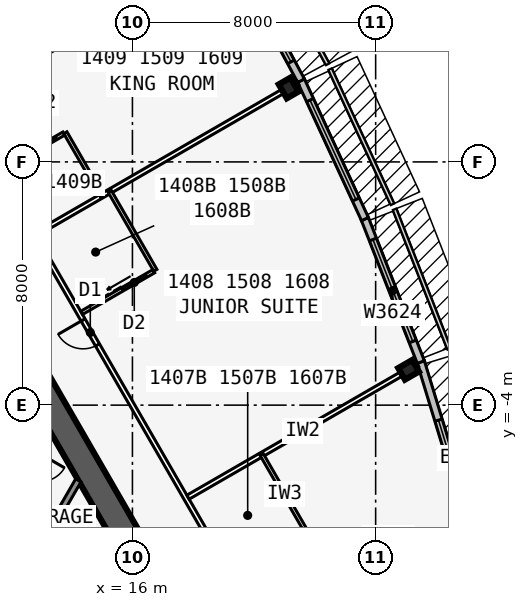
"""IFC4 building model, lengths in metres.
Left out: names, types, materials, properties, quantities, classifications, styles, units other than length and angle.
Written with IfcOpenShell. Run it as: python <this file> out.ifc"""

import sys

from ifc_helpers import new_model, si_unit, direction, frame, frame_2d, origin, origin_2d, place, context, subcontext, project, spatial, rectangle, i_section, extrude, element, fill, save


model = new_model("IFC4")
c1 = context("Model", 3, precision=1e-05, world=origin(), true_north=direction((0.0, 1.0)))
c2 = subcontext(c1, "Body", "Model", "MODEL_VIEW")
j1 = project(units=[si_unit("LENGTHUNIT", "METRE"), si_unit("PLANEANGLEUNIT", "RADIAN")], contexts=[c1])
p1 = place(None, origin())
s1 = spatial("IfcSite", under=j1, at=p1, CompositionType="ELEMENT")
p2 = place(p1, origin())
s2 = spatial("IfcBuilding", under=s1, at=p2, CompositionType="ELEMENT")
p3 = place(p2, frame((0.0, 0.0, 59.1)))
s3 = spatial("IfcBuildingStorey", under=s2, at=p3, CompositionType="ELEMENT", Elevation=59.1)
p4 = place(p3, frame((16.5, -9.526, 0.0), z_axis=(0.0, 0.0, 1.0), x_axis=(-0.499999749417, 0.866025548458, 0.0)))
e1 = element("IfcWall", 1, at=p4, inside=s3, PredefinedType="SHEAR", context=c2, shape_type="SweptSolid", body=[
    extrude(rectangle(XDim=33.0, YDim=0.9, at=frame_2d((16.5, 0.0))), origin(), (0.0, 0.0, 1.0), 3.4),
])
p5 = place(p4, frame((14.15, 0.0, 0.0)))
e2 = element("IfcOpeningElement", 2, at=p5, cuts=e1, PredefinedType="OPENING", context=c2, shape_type="SweptSolid", body=[
    extrude(rectangle(XDim=1.8, YDim=2.13, at=frame_2d((0.9, 1.065))), frame((0.0, 0.46, 0.0), z_axis=(0.0, -1.0, 0.0), x_axis=(1.0, 0.0, 0.0)), (0.0, 0.0, 1.0), 0.92),
])
p6 = place(p4, frame((12.6, 0.0, 0.0)))
e3 = element("IfcOpeningElement", 3, at=p6, cuts=e1, PredefinedType="OPENING", context=c2, shape_type="SweptSolid", body=[
    extrude(rectangle(XDim=1.0, YDim=2.13, at=frame_2d((0.5, 1.065))), frame((0.0, 0.46, 0.0), z_axis=(0.0, -1.0, 0.0), x_axis=(1.0, 0.0, 0.0)), (0.0, 0.0, 1.0), 0.92),
])
for number, where, z_axis, x_axis in (
    (4, (25.083, -2.839, 0.0), (0.0, 0.0, 1.0), (-0.5, 0.866, 0.0)),
    (5, (21.137, 6.43, 0.0), (0.0, 0.0, 1.0), (0.866, 0.5, 0.0)),
):
    element("IfcColumn", number, at=place(p3, frame(where, z_axis=z_axis, x_axis=x_axis)), inside=s3, PredefinedType="COLUMN", context=c2, shape_type="SweptSolid", body=[
        extrude(i_section(OverallWidth=0.442, OverallDepth=0.531, WebThickness=0.066, FlangeThickness=0.106, at=origin_2d()), origin(), (0.0, 0.0, 1.0), 3.4),
    ])
p7 = place(p3, frame((15.312, 8.84, 0.0), z_axis=(0.0, 0.0, 1.0), x_axis=(0.866025403784, 0.5, 0.0)))
e6 = element("IfcColumn", 6, at=p7, inside=s3, PredefinedType="COLUMN", context=c2, shape_type="SweptSolid", body=[
    extrude(rectangle(XDim=2.4, YDim=2.4, at=origin_2d()), origin(), (0.0, 0.0, 1.0), 3.4),
])
p8 = place(p3, frame((27.88, -10.429, 0.0), z_axis=(0.0, 0.0, 1.0), x_axis=(-0.2919790669, 0.956424709265, 0.0)))
e7 = element("IfcWall", 7, at=p8, inside=s3, PredefinedType="STANDARD", context=c2, shape_type="SweptSolid", body=[
    extrude(rectangle(XDim=8.211, YDim=0.25, at=frame_2d((4.105, 0.0))), origin(), (0.0, 0.0, 1.0), 3.235),
])
p9 = place(p8, frame((2.006, 0.0, 0.45)))
e8 = element("IfcOpeningElement", 8, at=p9, cuts=e7, PredefinedType="OPENING", context=c2, shape_type="SweptSolid", body=[
    extrude(rectangle(XDim=4.2, YDim=2.4, at=frame_2d((2.1, 1.2))), frame((0.0, 0.135, 0.0), z_axis=(0.0, -1.0, 0.0), x_axis=(1.0, 0.0, 0.0)), (0.0, 0.0, 1.0), 0.27),
])
p10 = place(p3, frame((25.486, -2.584, 0.0), z_axis=(0.0, 0.0, 1.0), x_axis=(-0.364013463868, 0.931393685894, 0.0)))
e9 = element("IfcWall", 9, at=p10, inside=s3, PredefinedType="STANDARD", context=c2, shape_type="SweptSolid", body=[
    extrude(rectangle(XDim=5.058, YDim=0.25, at=frame_2d((2.529, 0.0))), origin(), (0.0, 0.0, 1.0), 3.235),
])
p11 = place(p10, frame((0.729, 0.0, 0.45)))
e10 = element("IfcOpeningElement", 10, at=p11, cuts=e9, PredefinedType="OPENING", context=c2, shape_type="SweptSolid", body=[
    extrude(rectangle(XDim=3.6, YDim=2.4, at=frame_2d((1.8, 1.2))), frame((0.0, 0.135, 0.0), z_axis=(0.0, -1.0, 0.0), x_axis=(1.0, 0.0, 0.0)), (0.0, 0.0, 1.0), 0.27),
])
p12 = place(p3, frame((23.648, 2.119, 0.0), z_axis=(0.0, 0.0, 1.0), x_axis=(-0.419203100754, 0.907892482796, 0.0)))
e11 = element("IfcWall", 11, at=p12, inside=s3, PredefinedType="STANDARD", context=c2, shape_type="SweptSolid", body=[
    extrude(rectangle(XDim=5.021, YDim=0.25, at=frame_2d((2.51, 0.0))), origin(), (0.0, 0.0, 1.0), 3.235),
])
p13 = place(p12, frame((0.71, 0.0, 0.45)))
e12 = element("IfcOpeningElement", 12, at=p13, cuts=e11, PredefinedType="OPENING", context=c2, shape_type="SweptSolid", body=[
    extrude(rectangle(XDim=3.6, YDim=2.4, at=frame_2d((1.8, 1.2))), frame((0.0, 0.135, 0.0), z_axis=(0.0, -1.0, 0.0), x_axis=(1.0, 0.0, 0.0)), (0.0, 0.0, 1.0), 0.27),
])
p14 = place(p3, frame((21.547, 6.671, 0.0), z_axis=(0.0, 0.0, 1.0), x_axis=(-0.473412820489, 0.880840678782, 0.0)))
e13 = element("IfcWall", 13, at=p14, inside=s3, PredefinedType="STANDARD", context=c2, shape_type="SweptSolid", body=[
    extrude(rectangle(XDim=5.002, YDim=0.25, at=frame_2d((2.501, 0.0))), origin(), (0.0, 0.0, 1.0), 3.235),
])
p15 = place(p14, frame((0.701, 0.0, 0.45)))
e14 = element("IfcOpeningElement", 14, at=p15, cuts=e13, PredefinedType="OPENING", context=c2, shape_type="SweptSolid", body=[
    extrude(rectangle(XDim=3.6, YDim=2.4, at=frame_2d((1.8, 1.2))), frame((0.0, 0.135, 0.0), z_axis=(0.0, -1.0, 0.0), x_axis=(1.0, 0.0, 0.0)), (0.0, 0.0, 1.0), 0.27),
])
p16 = place(p3, frame((20.027, -10.985, 0.0), z_axis=(0.0, 0.0, 1.0), x_axis=(-0.500001677587, 0.866024435227, 0.0)))
e15 = element("IfcWall", 15, at=p16, inside=s3, PredefinedType="PARTITIONING", context=c2, shape_type="SweptSolid", body=[
    extrude(rectangle(XDim=39.054, YDim=0.15, at=frame_2d((19.527, 0.0))), origin(), (0.0, 0.0, 1.0), 3.235),
])
p17 = place(p16, frame((0.352, 0.0, 0.0)))
e16 = element("IfcOpeningElement", 16, at=p17, cuts=e15, PredefinedType="OPENING", context=c2, shape_type="SweptSolid", body=[
    extrude(rectangle(XDim=0.95, YDim=2.13, at=frame_2d((0.475, 1.065))), frame((0.0, 0.085, 0.0), z_axis=(0.0, -1.0, 0.0), x_axis=(1.0, 0.0, 0.0)), (0.0, 0.0, 1.0), 0.17),
])
p18 = place(p16, frame((10.352, 0.0, 0.0)))
e17 = element("IfcOpeningElement", 17, at=p18, cuts=e15, PredefinedType="OPENING", context=c2, shape_type="SweptSolid", body=[
    extrude(rectangle(XDim=0.95, YDim=2.13, at=frame_2d((0.475, 1.065))), frame((0.0, 0.085, 0.0), z_axis=(0.0, -1.0, 0.0), x_axis=(1.0, 0.0, 0.0)), (0.0, 0.0, 1.0), 0.17),
])
p19 = place(p16, frame((17.152, 0.0, 0.0)))
e18 = element("IfcOpeningElement", 18, at=p19, cuts=e15, PredefinedType="OPENING", context=c2, shape_type="SweptSolid", body=[
    extrude(rectangle(XDim=0.95, YDim=2.13, at=frame_2d((0.475, 1.065))), frame((0.0, 0.085, 0.0), z_axis=(0.0, -1.0, 0.0), x_axis=(1.0, 0.0, 0.0)), (0.0, 0.0, 1.0), 0.17),
])
p20 = place(p16, frame((20.952, 0.0, 0.0)))
e19 = element("IfcOpeningElement", 19, at=p20, cuts=e15, PredefinedType="OPENING", context=c2, shape_type="SweptSolid", body=[
    extrude(rectangle(XDim=0.95, YDim=2.13, at=frame_2d((0.475, 1.065))), frame((0.0, 0.085, 0.0), z_axis=(0.0, -1.0, 0.0), x_axis=(1.0, 0.0, 0.0)), (0.0, 0.0, 1.0), 0.17),
])
p21 = place(p16, frame((27.752, 0.0, 0.0)))
e20 = element("IfcOpeningElement", 20, at=p21, cuts=e15, PredefinedType="OPENING", context=c2, shape_type="SweptSolid", body=[
    extrude(rectangle(XDim=0.95, YDim=2.13, at=frame_2d((0.475, 1.065))), frame((0.0, 0.085, 0.0), z_axis=(0.0, -1.0, 0.0), x_axis=(1.0, 0.0, 0.0)), (0.0, 0.0, 1.0), 0.17),
])
p22 = place(p16, frame((37.752, 0.0, 0.0)))
e21 = element("IfcOpeningElement", 21, at=p22, cuts=e15, PredefinedType="OPENING", context=c2, shape_type="SweptSolid", body=[
    extrude(rectangle(XDim=0.95, YDim=2.13, at=frame_2d((0.475, 1.065))), frame((0.0, 0.085, 0.0), z_axis=(0.0, -1.0, 0.0), x_axis=(1.0, 0.0, 0.0)), (0.0, 0.0, 1.0), 0.17),
])
p23 = place(p3, frame((17.829, -7.027, 0.0), z_axis=(0.0, 0.0, 1.0), x_axis=(0.866032659912, 0.499987431809, 0.0)))
e22 = element("IfcWall", 22, at=p23, inside=s3, PredefinedType="PARTITIONING", context=c2, shape_type="SweptSolid", body=[
    extrude(rectangle(XDim=8.72, YDim=0.15, at=frame_2d((4.36, 0.0))), origin(), (0.0, 0.0, 1.0), 2.389),
])
p24 = place(p3, frame((12.829, 1.633, 0.0), z_axis=(0.0, 0.0, 1.0), x_axis=(0.866026934769, 0.499997348248, 0.0)))
e23 = element("IfcWall", 23, at=p24, inside=s3, PredefinedType="PARTITIONING", context=c2, shape_type="SweptSolid", body=[
    extrude(rectangle(XDim=9.943, YDim=0.15, at=frame_2d((4.971, 0.0))), origin(), (0.0, 0.0, 1.0), 2.389),
])
p25 = place(p3, frame((10.329, 5.963, 0.0), z_axis=(0.0, 0.0, 1.0), x_axis=(0.866021688545, 0.500006434927, 0.0)))
e24 = element("IfcWall", 24, at=p25, inside=s3, PredefinedType="PARTITIONING", context=c2, shape_type="SweptSolid", body=[
    extrude(rectangle(XDim=10.096, YDim=0.15, at=frame_2d((5.048, 0.0))), origin(), (0.0, 0.0, 1.0), 2.389),
])
for number, where, z_axis, x_axis in (
    (25, (21.753, -8.225, 0.0), (0.0, 0.0, 1.0), (-0.5, 0.866, 0.0)),
    (26, (16.753, 0.435, 0.0), (0.0, 0.0, 1.0), (-0.5, 0.866, 0.0)),
):
    element("IfcWall", number, at=place(p3, frame(where, z_axis=z_axis, x_axis=x_axis)), inside=s3, PredefinedType="PLUMBINGWALL", context=c2, shape_type="SweptSolid", body=[
        extrude(rectangle(XDim=3.0, YDim=0.12, at=frame_2d((1.5, 0.0))), origin(), (0.0, 0.0, 1.0), 3.235),
    ])
p26 = place(p3, frame((14.329, -0.965, 0.0), z_axis=(0.0, 0.0, 1.0), x_axis=(0.866035715982, 0.499982138324, 0.0)))
e27 = element("IfcWall", 27, at=p26, inside=s3, PredefinedType="PLUMBINGWALL", context=c2, shape_type="SweptSolid", body=[
    extrude(rectangle(XDim=2.74, YDim=0.12, at=frame_2d((1.37, 0.0))), origin(), (0.0, 0.0, 1.0), 3.235),
])
p27 = place(p26, frame((1.55, 0.0, 0.0)))
e28 = element("IfcOpeningElement", 28, at=p27, cuts=e27, PredefinedType="OPENING", context=c2, shape_type="SweptSolid", body=[
    extrude(rectangle(XDim=0.9, YDim=2.13, at=frame_2d((0.45, 1.065))), frame((0.0, 0.07, 0.0), z_axis=(0.0, -1.0, 0.0), x_axis=(1.0, 0.0, 0.0)), (0.0, 0.0, 1.0), 0.14),
])
p28 = place(p3, frame((14.993, 2.883, 0.0), z_axis=(0.0, 0.0, 1.0), x_axis=(-0.500001309137, 0.866024647952, 0.0)))
e29 = element("IfcWall", 29, at=p28, inside=s3, PredefinedType="PLUMBINGWALL", context=c2, shape_type="SweptSolid", body=[
    extrude(rectangle(XDim=2.4, YDim=0.12, at=frame_2d((1.2, 0.0))), origin(), (0.0, 0.0, 1.0), 3.235),
])
p29 = place(p3, frame((11.628, 3.711, 0.0), z_axis=(0.0, 0.0, 1.0), x_axis=(0.866048967903, 0.499959183527, 0.0)))
e30 = element("IfcWall", 30, at=p29, inside=s3, PredefinedType="PLUMBINGWALL", context=c2, shape_type="SweptSolid", body=[
    extrude(rectangle(XDim=2.44, YDim=0.12, at=frame_2d((1.22, 0.0))), origin(), (0.0, 0.0, 1.0), 3.235),
])
p30 = place(p29, frame((1.25, 0.0, 0.0)))
e31 = element("IfcOpeningElement", 31, at=p30, cuts=e30, PredefinedType="OPENING", context=c2, shape_type="SweptSolid", body=[
    extrude(rectangle(XDim=0.9, YDim=2.13, at=frame_2d((0.45, 1.065))), frame((0.0, 0.07, 0.0), z_axis=(0.0, -1.0, 0.0), x_axis=(1.0, 0.0, 0.0)), (0.0, 0.0, 1.0), 0.14),
])
p31 = place(p3, frame((14.219, -6.476, 0.0), z_axis=(0.0, 0.0, 1.0), x_axis=(-0.499952404951, -0.866052881055, 0.0)))
e32 = element("IfcWall", 32, at=p31, inside=s3, PredefinedType="SOLIDWALL", context=c2, shape_type="SweptSolid", body=[
    extrude(rectangle(XDim=3.002, YDim=0.2, at=frame_2d((1.501, 0.0))), origin(), (0.0, 0.0, 1.0), 3.235),
])
p32 = place(p3, frame((13.354, -4.976, 0.0), z_axis=(0.0, 0.0, 1.0), x_axis=(-0.499999210213, -0.866025859768, 0.0)))
e33 = element("IfcWall", 33, at=p32, inside=s3, PredefinedType="PARTITIONING", context=c2, shape_type="SweptSolid", body=[
    extrude(rectangle(XDim=4.734, YDim=0.1, at=frame_2d((2.367, 0.0))), origin(), (0.0, 0.0, 1.0), 3.235),
])
p33 = place(p32, frame((0.734, 0.0, 0.0)))
e34 = element("IfcOpeningElement", 34, at=p33, cuts=e33, PredefinedType="OPENING", context=c2, shape_type="SweptSolid", body=[
    extrude(rectangle(XDim=0.9, YDim=2.13, at=frame_2d((0.45, 1.065))), frame((0.0, 0.06, 0.0), z_axis=(0.0, -1.0, 0.0), x_axis=(1.0, 0.0, 0.0)), (0.0, 0.0, 1.0), 0.12),
])
p34 = place(p9, origin())
e35 = element("IfcWindow", 35, at=p34, inside=s3, PartitioningType="SINGLE_PANEL", PredefinedType="WINDOW", context=c2, shape_type="SweptSolid", body=[
    extrude(rectangle(XDim=4.2, YDim=2.4, at=frame_2d((2.1, 1.2))), frame((0.0, 0.03, 0.0), z_axis=(0.0, -1.0, 0.0), x_axis=(1.0, 0.0, 0.0)), (0.0, 0.0, 1.0), 0.06),
])
fill(e8, e35)
p35 = place(p11, origin())
e36 = element("IfcWindow", 36, at=p35, inside=s3, PartitioningType="SINGLE_PANEL", PredefinedType="WINDOW", context=c2, shape_type="SweptSolid", body=[
    extrude(rectangle(XDim=3.6, YDim=2.4, at=frame_2d((1.8, 1.2))), frame((0.0, 0.03, 0.0), z_axis=(0.0, -1.0, 0.0), x_axis=(1.0, 0.0, 0.0)), (0.0, 0.0, 1.0), 0.06),
])
fill(e10, e36)
p36 = place(p13, origin())
e37 = element("IfcWindow", 37, at=p36, inside=s3, PartitioningType="SINGLE_PANEL", PredefinedType="WINDOW", context=c2, shape_type="SweptSolid", body=[
    extrude(rectangle(XDim=3.6, YDim=2.4, at=frame_2d((1.8, 1.2))), frame((0.0, 0.03, 0.0), z_axis=(0.0, -1.0, 0.0), x_axis=(1.0, 0.0, 0.0)), (0.0, 0.0, 1.0), 0.06),
])
fill(e12, e37)
p37 = place(p15, origin())
e38 = element("IfcWindow", 38, at=p37, inside=s3, PartitioningType="SINGLE_PANEL", PredefinedType="WINDOW", context=c2, shape_type="SweptSolid", body=[
    extrude(rectangle(XDim=3.6, YDim=2.4, at=frame_2d((1.8, 1.2))), frame((0.0, 0.03, 0.0), z_axis=(0.0, -1.0, 0.0), x_axis=(1.0, 0.0, 0.0)), (0.0, 0.0, 1.0), 0.06),
])
fill(e14, e38)
p38 = place(p27, origin())
e39 = element("IfcDoor", 39, at=p38, inside=s3, OperationType="SLIDING_TO_LEFT", PredefinedType="DOOR", context=c2, shape_type="SweptSolid", body=[
    extrude(rectangle(XDim=0.9, YDim=2.13, at=frame_2d((0.45, 1.065))), frame((0.0, 0.025, 0.0), z_axis=(0.0, -1.0, 0.0), x_axis=(1.0, 0.0, 0.0)), (0.0, 0.0, 1.0), 0.05),
])
fill(e28, e39)
p39 = place(p18, origin())
e40 = element("IfcDoor", 40, at=p39, inside=s3, OperationType="SINGLE_SWING_RIGHT", PredefinedType="DOOR", context=c2, shape_type="SweptSolid", body=[
    extrude(rectangle(XDim=0.95, YDim=2.13, at=frame_2d((0.475, 1.065))), frame((0.0, 0.025, 0.0), z_axis=(0.0, -1.0, 0.0), x_axis=(1.0, 0.0, 0.0)), (0.0, 0.0, 1.0), 0.05),
])
fill(e17, e40)
p40 = place(p30, origin())
e41 = element("IfcDoor", 41, at=p40, inside=s3, OperationType="SLIDING_TO_LEFT", PredefinedType="DOOR", context=c2, shape_type="SweptSolid", body=[
    extrude(rectangle(XDim=0.9, YDim=2.13, at=frame_2d((0.45, 1.065))), frame((0.0, 0.025, 0.0), z_axis=(0.0, -1.0, 0.0), x_axis=(1.0, 0.0, 0.0)), (0.0, 0.0, 1.0), 0.05),
])
fill(e31, e41)
save(model, sys.argv[1])
